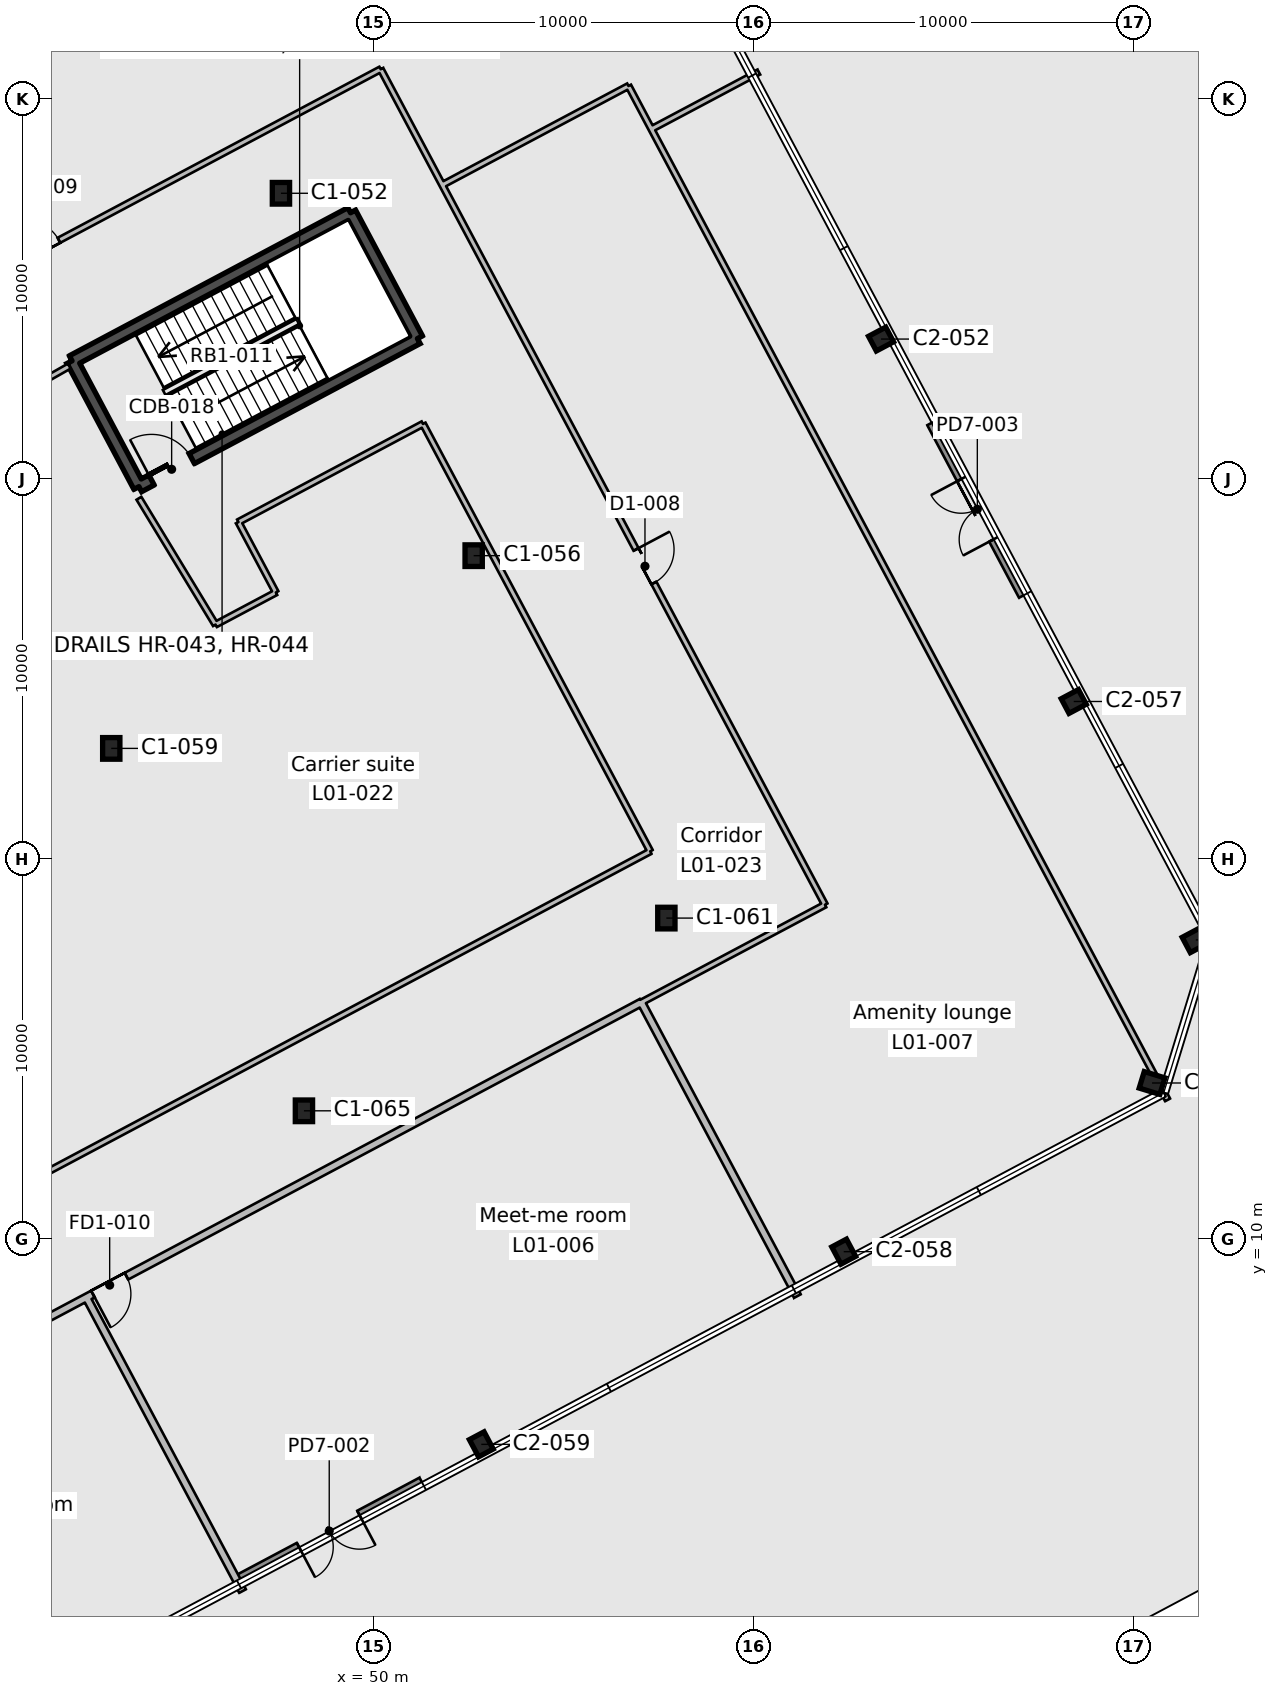
"""IFC4 building model, lengths in metres.
Left out: names, types, materials, properties, quantities, classifications, styles, units other than length and angle.
Written with IfcOpenShell. Run it as: python <this file> out.ifc"""

import sys

from ifc_helpers import new_model, si_unit, direction, frame, frame_2d, origin, origin_2d, place, context, subcontext, project, spatial, rectangle, i_section, extrude, element, fill, save


model = new_model("IFC4")
c1 = context("Model", 3, precision=1e-05, world=origin(), true_north=direction((0.0, 1.0)))
c2 = subcontext(c1, "Body", "Model", "MODEL_VIEW")
j1 = project(units=[si_unit("LENGTHUNIT", "METRE"), si_unit("PLANEANGLEUNIT", "RADIAN")], contexts=[c1])
p1 = place(None, origin())
s1 = spatial("IfcSite", under=j1, at=p1, CompositionType="ELEMENT")
p2 = place(p1, origin())
s2 = spatial("IfcBuilding", under=s1, at=p2, CompositionType="ELEMENT")
p3 = place(p2, frame((0.0, 0.0, 7.0)))
s3 = spatial("IfcBuildingStorey", under=s2, at=p3, CompositionType="ELEMENT", Elevation=7.0)
for number, where, z_axis, x_axis in (
    (1, (52.825, 4.598, 0.0), (0.0, 0.0, 1.0), (0.883, 0.469, 0.0)),
    (2, (62.361, 9.668, 0.0), (0.0, 0.0, 1.0), (0.883, 0.469, 0.0)),
):
    element("IfcColumn", number, at=place(p3, frame(where, z_axis=z_axis, x_axis=x_axis)), inside=s3, PredefinedType="COLUMN", context=c2, shape_type="SweptSolid", body=[
        extrude(i_section(OverallWidth=0.437, OverallDepth=0.513, WebThickness=0.061, FlangeThickness=0.097, FilletRadius=0.015, at=origin_2d()), origin(), (0.0, 0.0, 1.0), 5.2),
    ])
for number, where, z_axis, x_axis in (
    (3, (48.158, 13.374, 0.0), (0.0, 0.0, 1.0), (1.0, 0.0, 0.0)),
    (4, (70.474, 14.106, 0.0), (0.0, 0.0, 1.0), (0.292, 0.956, 0.0)),
    (5, (71.625, 17.871, 0.0), (0.0, 0.0, 1.0), (-0.469, 0.883, 0.0)),
    (6, (57.694, 18.445, 0.0), (0.0, 0.0, 1.0), (1.0, 0.0, 0.0)),
    (7, (43.088, 22.91, 0.0), (0.0, 0.0, 1.0), (1.0, 0.0, 0.0)),
):
    element("IfcColumn", number, at=place(p3, frame(where, z_axis=z_axis, x_axis=x_axis)), inside=s3, PredefinedType="COLUMN", context=c2, shape_type="SweptSolid", body=[
        extrude(i_section(OverallWidth=0.455, OverallDepth=0.569, WebThickness=0.078, FlangeThickness=0.125, FilletRadius=0.015, at=origin_2d()), origin(), (0.0, 0.0, 1.0), 5.2),
    ])
p4 = place(p3, frame((68.413, 24.144, 0.0), z_axis=(0.0, 0.0, 1.0), x_axis=(-0.469471562786, 0.882947592859, 0.0)))
e8 = element("IfcColumn", 8, at=p4, inside=s3, PredefinedType="COLUMN", context=c2, shape_type="SweptSolid", body=[
    extrude(i_section(OverallWidth=0.437, OverallDepth=0.513, WebThickness=0.061, FlangeThickness=0.097, FilletRadius=0.015, at=origin_2d()), origin(), (0.0, 0.0, 1.0), 5.2),
])
p5 = place(p3, frame((52.624, 27.981, 0.0), z_axis=(0.0, 0.0, 1.0), x_axis=(1.0, 0.0, 0.0)))
e9 = element("IfcColumn", 9, at=p5, inside=s3, PredefinedType="COLUMN", context=c2, shape_type="SweptSolid", body=[
    extrude(i_section(OverallWidth=0.455, OverallDepth=0.569, WebThickness=0.078, FlangeThickness=0.125, FilletRadius=0.015, at=origin_2d()), origin(), (0.0, 0.0, 1.0), 5.2),
])
p6 = place(p3, frame((63.343, 33.68, 0.0), z_axis=(0.0, 0.0, 1.0), x_axis=(-0.469471562786, 0.882947592859, 0.0)))
e10 = element("IfcColumn", 10, at=p6, inside=s3, PredefinedType="COLUMN", context=c2, shape_type="SweptSolid", body=[
    extrude(i_section(OverallWidth=0.437, OverallDepth=0.513, WebThickness=0.061, FlangeThickness=0.097, FilletRadius=0.015, at=origin_2d()), origin(), (0.0, 0.0, 1.0), 5.2),
])
p7 = place(p3, frame((47.553, 37.516, 0.0), z_axis=(0.0, 0.0, 1.0), x_axis=(1.0, 0.0, 0.0)))
e11 = element("IfcColumn", 11, at=p7, inside=s3, PredefinedType="COLUMN", context=c2, shape_type="SweptSolid", body=[
    extrude(i_section(OverallWidth=0.455, OverallDepth=0.569, WebThickness=0.078, FlangeThickness=0.125, FilletRadius=0.015, at=origin_2d()), origin(), (0.0, 0.0, 1.0), 5.2),
])
p8 = place(p3, frame((49.384, 37.004, 0.0), z_axis=(0.0, 0.0, 1.0), x_axis=(0.46946936446, -0.882948761726, 0.0)))
e12 = element("IfcWall", 12, at=p8, inside=s3, PredefinedType="SHEAR", context=c2, shape_type="SweptSolid", body=[
    extrude(rectangle(XDim=3.75, YDim=0.3, at=frame_2d((1.875, 0.0))), origin(), (0.0, 0.0, 1.0), 5.2),
])
p9 = place(p3, frame((51.145, 33.693, 0.0), z_axis=(0.0, 0.0, 1.0), x_axis=(-0.882945809314, -0.469474917132, 0.0)))
e13 = element("IfcWall", 13, at=p9, inside=s3, PredefinedType="SHEAR", context=c2, shape_type="SweptSolid", body=[
    extrude(rectangle(XDim=8.3, YDim=0.3, at=frame_2d((4.15, 0.0))), origin(), (0.0, 0.0, 1.0), 5.2),
])
p10 = place(p9, frame((6.725, 0.0, 0.0)))
e14 = element("IfcOpeningElement", 14, at=p10, cuts=e13, PredefinedType="OPENING", context=c2, shape_type="SweptSolid", body=[
    extrude(rectangle(XDim=1.2, YDim=2.1, at=frame_2d((0.6, 1.05))), frame((0.0, 0.16, 0.0), z_axis=(0.0, -1.0, 0.0), x_axis=(1.0, 0.0, 0.0)), (0.0, 0.0, 1.0), 0.32),
])
p11 = place(p3, frame((43.816, 29.796, 0.0), z_axis=(0.0, 0.0, 1.0), x_axis=(-0.46946936446, 0.882948761726, 0.0)))
e15 = element("IfcWall", 15, at=p11, inside=s3, PredefinedType="SHEAR", context=c2, shape_type="SweptSolid", body=[
    extrude(rectangle(XDim=3.75, YDim=0.3, at=frame_2d((1.875, 0.0))), origin(), (0.0, 0.0, 1.0), 5.2),
])
p12 = place(p3, frame((42.055, 33.107, 0.0), z_axis=(0.0, 0.0, 1.0), x_axis=(0.882945809314, 0.469474917132, 0.0)))
e16 = element("IfcWall", 16, at=p12, inside=s3, PredefinedType="SHEAR", context=c2, shape_type="SweptSolid", body=[
    extrude(rectangle(XDim=8.3, YDim=0.3, at=frame_2d((4.15, 0.0))), origin(), (0.0, 0.0, 1.0), 5.2),
])
p13 = place(p3, frame((46.39, 1.024, 0.0), z_axis=(0.0, 0.0, 1.0), x_axis=(0.88294935199, 0.469468254326, 0.0)))
e17 = element("IfcWall", 17, at=p13, inside=s3, PredefinedType="STANDARD", context=c2, shape_type="SweptSolid", body=[
    extrude(rectangle(XDim=5.512, YDim=0.25, at=frame_2d((2.756, 0.0))), origin(), (0.0, 0.0, 1.0), 3.612),
])
p14 = place(p13, frame((1.856, 0.0, 0.0)))
e18 = element("IfcOpeningElement", 18, at=p14, cuts=e17, PredefinedType="OPENING", context=c2, shape_type="SweptSolid", body=[
    extrude(rectangle(XDim=1.8, YDim=2.4, at=frame_2d((0.9, 1.2))), frame((0.0, 0.135, 0.0), z_axis=(0.0, -1.0, 0.0), x_axis=(1.0, 0.0, 0.0)), (0.0, 0.0, 1.0), 0.27),
])
p15 = place(p3, frame((67.083, 26.932, 0.0), z_axis=(0.0, 0.0, 1.0), x_axis=(-0.469442125026, 0.882963244564, 0.0)))
e19 = element("IfcWall", 19, at=p15, inside=s3, PredefinedType="STANDARD", context=c2, shape_type="SweptSolid", body=[
    extrude(rectangle(XDim=5.143, YDim=0.25, at=frame_2d((2.571, 0.0))), origin(), (0.0, 0.0, 1.0), 3.612),
])
p16 = place(p15, frame((1.671, 0.0, 0.0)))
e20 = element("IfcOpeningElement", 20, at=p16, cuts=e19, PredefinedType="OPENING", context=c2, shape_type="SweptSolid", body=[
    extrude(rectangle(XDim=1.8, YDim=2.4, at=frame_2d((0.9, 1.2))), frame((0.0, 0.135, 0.0), z_axis=(0.0, -1.0, 0.0), x_axis=(1.0, 0.0, 0.0)), (0.0, 0.0, 1.0), 0.27),
])
p17 = place(p3, frame((57.041, 16.229, 0.0), z_axis=(0.0, 0.0, 1.0), x_axis=(-0.882947975476, -0.469470843188, 0.0)))
e21 = element("IfcWall", 21, at=p17, inside=s3, PredefinedType="PARTITIONING", context=c2, shape_type="SweptSolid", body=[
    extrude(rectangle(XDim=49.2, YDim=0.2, at=frame_2d((24.6, 0.0))), origin(), (0.0, 0.0, 1.0), 4.75),
])
p18 = place(p17, frame((27.75, 0.0, 0.0)))
e22 = element("IfcOpeningElement", 22, at=p18, cuts=e21, PredefinedType="OPENING", context=c2, shape_type="SweptSolid", body=[
    extrude(rectangle(XDim=1.0, YDim=2.1, at=frame_2d((0.5, 1.05))), frame((0.0, 0.11, 0.0), z_axis=(0.0, -1.0, 0.0), x_axis=(1.0, 0.0, 0.0)), (0.0, 0.0, 1.0), 0.22),
])
p19 = place(p17, frame((24.05, 0.0, 0.0)))
e23 = element("IfcOpeningElement", 23, at=p19, cuts=e21, PredefinedType="OPENING", context=c2, shape_type="SweptSolid", body=[
    extrude(rectangle(XDim=1.0, YDim=2.1, at=frame_2d((0.5, 1.05))), frame((0.0, 0.11, 0.0), z_axis=(0.0, -1.0, 0.0), x_axis=(1.0, 0.0, 0.0)), (0.0, 0.0, 1.0), 0.22),
])
p20 = place(p17, frame((15.35, 0.0, 0.0)))
e24 = element("IfcOpeningElement", 24, at=p20, cuts=e21, PredefinedType="OPENING", context=c2, shape_type="SweptSolid", body=[
    extrude(rectangle(XDim=1.0, YDim=2.1, at=frame_2d((0.5, 1.05))), frame((0.0, 0.11, 0.0), z_axis=(0.0, -1.0, 0.0), x_axis=(1.0, 0.0, 0.0)), (0.0, 0.0, 1.0), 0.22),
])
p21 = place(p3, frame((28.633, 35.611, 0.0), z_axis=(0.0, 0.0, 1.0), x_axis=(0.882947109015, 0.469472472762, 0.0)))
e25 = element("IfcWall", 25, at=p21, inside=s3, PredefinedType="PARTITIONING", context=c2, shape_type="SweptSolid", body=[
    extrude(rectangle(XDim=16.484, YDim=0.2, at=frame_2d((8.242, 0.0))), origin(), (0.0, 0.0, 1.0), 4.75),
])
p22 = place(p3, frame((32.308, 31.279, 0.0), z_axis=(0.0, 0.0, 1.0), x_axis=(0.882939951573, 0.469485933673, 0.0)))
e26 = element("IfcWall", 26, at=p22, inside=s3, PredefinedType="PARTITIONING", context=c2, shape_type="SweptSolid", body=[
    extrude(rectangle(XDim=20.239, YDim=0.15, at=frame_2d((10.12, 0.0))), origin(), (0.0, 0.0, 1.0), 4.75),
])
p23 = place(p22, frame((9.65, 0.0, 0.0)))
e27 = element("IfcOpeningElement", 27, at=p23, cuts=e26, PredefinedType="OPENING", context=c2, shape_type="SweptSolid", body=[
    extrude(rectangle(XDim=1.0, YDim=2.1, at=frame_2d((0.5, 1.05))), frame((0.0, 0.085, 0.0), z_axis=(0.0, -1.0, 0.0), x_axis=(1.0, 0.0, 0.0)), (0.0, 0.0, 1.0), 0.17),
])
p24 = place(p3, frame((50.178, 40.781, 0.0), z_axis=(0.0, 0.0, 1.0), x_axis=(0.469355564401, -0.883009260521, 0.0)))
e28 = element("IfcWall", 28, at=p24, inside=s3, PredefinedType="PARTITIONING", context=c2, shape_type="SweptSolid", body=[
    extrude(rectangle(XDim=3.445, YDim=0.15, at=frame_2d((1.723, 0.0))), origin(), (0.0, 0.0, 1.0), 4.75),
])
p25 = place(p3, frame((42.435, 8.462, 0.0), z_axis=(0.0, 0.0, 1.0), x_axis=(0.469519026901, -0.882922354105, 0.0)))
e29 = element("IfcWall", 29, at=p25, inside=s3, PredefinedType="PARTITIONING", context=c2, shape_type="SweptSolid", body=[
    extrude(rectangle(XDim=8.749, YDim=0.2, at=frame_2d((4.375, 0.0))), origin(), (0.0, 0.0, 1.0), 4.75),
])
p26 = place(p3, frame((48.541, 15.56, 0.0), z_axis=(0.0, 0.0, 1.0), x_axis=(-0.882933406877, -0.469498241765, 0.0)))
e30 = element("IfcWall", 30, at=p26, inside=s3, PredefinedType="PARTITIONING", context=c2, shape_type="SweptSolid", body=[
    extrude(rectangle(XDim=10.164, YDim=0.15, at=frame_2d((5.082, 0.0))), origin(), (0.0, 0.0, 1.0), 4.75),
])
p27 = place(p3, frame((31.069, 26.77, 0.0), z_axis=(0.0, 0.0, 1.0), x_axis=(0.86954617394, 0.493851649168, 0.0)))
e31 = element("IfcWall", 31, at=p27, inside=s3, PredefinedType="PARTITIONING", context=c2, shape_type="SweptSolid", body=[
    extrude(rectangle(XDim=12.55, YDim=0.15, at=frame_2d((6.275, 0.0))), origin(), (0.0, 0.0, 1.0), 4.75),
])
p28 = place(p3, frame((43.816, 29.491, 0.0), z_axis=(0.0, 0.0, 1.0), x_axis=(0.518473208291, -0.855093873376, 0.0)))
e32 = element("IfcWall", 32, at=p28, inside=s3, PredefinedType="PARTITIONING", context=c2, shape_type="SweptSolid", body=[
    extrude(rectangle(XDim=1.325, YDim=0.15, at=frame_2d((0.663, 0.0))), origin(), (0.0, 0.0, 1.0), 4.75),
])
p29 = place(p3, frame((45.831, 26.167, 0.0), z_axis=(0.0, 0.0, 1.0), x_axis=(-0.518386189645, 0.855146629757, 0.0)))
e33 = element("IfcWall", 33, at=p29, inside=s3, PredefinedType="PARTITIONING", context=c2, shape_type="SweptSolid", body=[
    extrude(rectangle(XDim=2.562, YDim=0.15, at=frame_2d((1.281, 0.0))), origin(), (0.0, 0.0, 1.0), 4.75),
])
p30 = place(p3, frame((47.42, 27.012, 0.0), z_axis=(0.0, 0.0, 1.0), x_axis=(-0.882911879422, -0.469538723829, 0.0)))
e34 = element("IfcWall", 34, at=p30, inside=s3, PredefinedType="PARTITIONING", context=c2, shape_type="SweptSolid", body=[
    extrude(rectangle(XDim=1.8, YDim=0.15, at=frame_2d((0.9, 0.0))), origin(), (0.0, 0.0, 1.0), 4.75),
])
p31 = place(p3, frame((57.034, 16.225, 0.0), z_axis=(0.0, 0.0, 1.0), x_axis=(0.469482945701, -0.882941540361, 0.0)))
e35 = element("IfcWall", 35, at=p31, inside=s3, PredefinedType="PARTITIONING", context=c2, shape_type="SweptSolid", body=[
    extrude(rectangle(XDim=8.75, YDim=0.2, at=frame_2d((4.375, 0.0))), origin(), (0.0, 0.0, 1.0), 4.75),
])
p32 = place(p3, frame((46.434, 28.866, 0.0), z_axis=(0.0, 0.0, 1.0), x_axis=(0.882942083458, 0.469481924316, 0.0)))
e36 = element("IfcWall", 36, at=p32, inside=s3, PredefinedType="PARTITIONING", context=c2, shape_type="SweptSolid", body=[
    extrude(rectangle(XDim=5.5, YDim=0.15, at=frame_2d((2.75, 0.0))), origin(), (0.0, 0.0, 1.0), 4.75),
])
p33 = place(p3, frame((51.29, 31.448, 0.0), z_axis=(0.0, 0.0, 1.0), x_axis=(0.469459757109, -0.882953869947, 0.0)))
e37 = element("IfcWall", 37, at=p33, inside=s3, PredefinedType="PARTITIONING", context=c2, shape_type="SweptSolid", body=[
    extrude(rectangle(XDim=12.738, YDim=0.15, at=frame_2d((6.369, 0.0))), origin(), (0.0, 0.0, 1.0), 4.75),
])
p34 = place(p3, frame((57.27, 20.201, 0.0), z_axis=(0.0, 0.0, 1.0), x_axis=(-0.882965394181, -0.469438081837, 0.0)))
e38 = element("IfcWall", 38, at=p34, inside=s3, PredefinedType="PARTITIONING", context=c2, shape_type="SweptSolid", body=[
    extrude(rectangle(XDim=9.886, YDim=0.15, at=frame_2d((4.943, 0.0))), origin(), (0.0, 0.0, 1.0), 4.75),
])
p35 = place(p3, frame((47.42, 27.012, 0.0), z_axis=(0.0, 0.0, 1.0), x_axis=(-0.469489562011, 0.882938022266, 0.0)))
e39 = element("IfcWall", 39, at=p35, inside=s3, PredefinedType="PARTITIONING", context=c2, shape_type="SweptSolid", body=[
    extrude(rectangle(XDim=2.1, YDim=0.15, at=frame_2d((1.05, 0.0))), origin(), (0.0, 0.0, 1.0), 4.75),
])
p36 = place(p3, frame((51.795, 37.739, 0.0), z_axis=(0.0, 0.0, 1.0), x_axis=(0.469473160434, -0.882946743373, 0.0)))
e40 = element("IfcWall", 40, at=p36, inside=s3, PredefinedType="PARTITIONING", context=c2, shape_type="SweptSolid", body=[
    extrude(rectangle(XDim=1.216, YDim=0.15, at=frame_2d((0.608, 0.0))), origin(), (0.0, 0.0, 1.0), 4.75),
])
p37 = place(p3, frame((52.351, 38.029, 0.0), z_axis=(0.0, 0.0, 1.0), x_axis=(0.882969925021, 0.469429559688, 0.0)))
e41 = element("IfcWall", 41, at=p37, inside=s3, PredefinedType="PARTITIONING", context=c2, shape_type="SweptSolid", body=[
    extrude(rectangle(XDim=4.923, YDim=0.15, at=frame_2d((2.461, 0.0))), origin(), (0.0, 0.0, 1.0), 4.75),
])
p38 = place(p3, frame((56.698, 40.34, 0.0), z_axis=(0.0, 0.0, 1.0), x_axis=(0.468946315527, -0.883226671446, 0.0)))
e42 = element("IfcWall", 42, at=p38, inside=s3, PredefinedType="PARTITIONING", context=c2, shape_type="SweptSolid", body=[
    extrude(rectangle(XDim=1.282, YDim=0.15, at=frame_2d((0.641, 0.0))), origin(), (0.0, 0.0, 1.0), 4.75),
])
p39 = place(p3, frame((51.798, 37.734, 0.0), z_axis=(0.0, 0.0, 1.0), x_axis=(0.882191163795, 0.470891442396, 0.0)))
e43 = element("IfcWall", 43, at=p39, inside=s3, PredefinedType="PARTITIONING", context=c2, shape_type="SweptSolid", body=[
    extrude(rectangle(XDim=0.627, YDim=0.15, at=frame_2d((0.313, 0.0))), origin(), (0.0, 0.0, 1.0), 4.75),
])
p40 = place(p3, frame((57.041, 16.229, 0.0), z_axis=(0.0, 0.0, 1.0), x_axis=(0.882918476145, 0.469526319265, 0.0)))
e44 = element("IfcWall", 44, at=p40, inside=s3, PredefinedType="PARTITIONING", context=c2, shape_type="SweptSolid", body=[
    extrude(rectangle(XDim=5.467, YDim=0.15, at=frame_2d((2.733, 0.0))), origin(), (0.0, 0.0, 1.0), 4.75),
])
p41 = place(p3, frame((52.366, 36.665, 0.0), z_axis=(0.0, 0.0, 1.0), x_axis=(0.469480933333, -0.882942610387, 0.0)))
e45 = element("IfcWall", 45, at=p41, inside=s3, PredefinedType="PARTITIONING", context=c2, shape_type="SweptSolid", body=[
    extrude(rectangle(XDim=20.239, YDim=0.15, at=frame_2d((10.12, 0.0))), origin(), (0.0, 0.0, 1.0), 4.75),
])
p42 = place(p41, frame((9.65, 0.0, 0.0)))
e46 = element("IfcOpeningElement", 46, at=p42, cuts=e45, PredefinedType="OPENING", context=c2, shape_type="SweptSolid", body=[
    extrude(rectangle(XDim=1.0, YDim=2.1, at=frame_2d((0.5, 1.05))), frame((0.0, 0.085, 0.0), z_axis=(0.0, -1.0, 0.0), x_axis=(1.0, 0.0, 0.0)), (0.0, 0.0, 1.0), 0.17),
])
p43 = place(p3, frame((57.299, 39.208, 0.0), z_axis=(0.0, 0.0, 1.0), x_axis=(0.469480728433, -0.882942719337, 0.0)))
e47 = element("IfcWall", 47, at=p43, inside=s3, PredefinedType="PARTITIONING", context=c2, shape_type="SweptSolid", body=[
    extrude(rectangle(XDim=28.934, YDim=0.15, at=frame_2d((14.467, 0.0))), origin(), (0.0, 0.0, 1.0), 4.75),
])
p44 = place(p3, frame((60.127, 40.707, 0.0), z_axis=(0.0, 0.0, 1.0), x_axis=(-0.883027796121, -0.469320691295, 0.0)))
e48 = element("IfcWall", 48, at=p44, inside=s3, PredefinedType="PARTITIONING", context=c2, shape_type="SweptSolid", body=[
    extrude(rectangle(XDim=3.2, YDim=0.15, at=frame_2d((1.6, 0.0))), origin(), (0.0, 0.0, 1.0), 4.75),
])
p45 = place(p10, frame((1.2, 0.0, 0.0), z_axis=(0.0, 0.0, 1.0), x_axis=(-1.0, 0.0, 0.0)))
e49 = element("IfcDoor", 49, at=p45, inside=s3, OperationType="SINGLE_SWING_LEFT", PredefinedType="DOOR", context=c2, shape_type="SweptSolid", body=[
    extrude(rectangle(XDim=1.2, YDim=2.1, at=frame_2d((0.6, 1.05))), frame((0.0, 0.025, 0.0), z_axis=(0.0, -1.0, 0.0), x_axis=(1.0, 0.0, 0.0)), (0.0, 0.0, 1.0), 0.05),
])
fill(e14, e49)
p46 = place(p14, frame((1.8, 0.0, 0.0), z_axis=(0.0, 0.0, 1.0), x_axis=(-1.0, 0.0, 0.0)))
e50 = element("IfcDoor", 50, at=p46, inside=s3, OperationType="DOUBLE_DOOR_SINGLE_SWING", PredefinedType="DOOR", context=c2, shape_type="SweptSolid", body=[
    extrude(rectangle(XDim=1.8, YDim=2.4, at=frame_2d((0.9, 1.2))), frame((0.0, 0.025, 0.0), z_axis=(0.0, -1.0, 0.0), x_axis=(1.0, 0.0, 0.0)), (0.0, 0.0, 1.0), 0.05),
])
fill(e18, e50)
p47 = place(p16, origin())
e51 = element("IfcDoor", 51, at=p47, inside=s3, OperationType="DOUBLE_DOOR_SINGLE_SWING", PredefinedType="DOOR", context=c2, shape_type="SweptSolid", body=[
    extrude(rectangle(XDim=1.8, YDim=2.4, at=frame_2d((0.9, 1.2))), frame((0.0, 0.025, 0.0), z_axis=(0.0, -1.0, 0.0), x_axis=(1.0, 0.0, 0.0)), (0.0, 0.0, 1.0), 0.05),
])
fill(e20, e51)
p48 = place(p20, origin())
e52 = element("IfcDoor", 52, at=p48, inside=s3, OperationType="SINGLE_SWING_RIGHT", PredefinedType="DOOR", context=c2, shape_type="SweptSolid", body=[
    extrude(rectangle(XDim=1.0, YDim=2.1, at=frame_2d((0.5, 1.05))), frame((0.0, 0.025, 0.0), z_axis=(0.0, -1.0, 0.0), x_axis=(1.0, 0.0, 0.0)), (0.0, 0.0, 1.0), 0.05),
])
fill(e24, e52)
p49 = place(p42, origin())
e53 = element("IfcDoor", 53, at=p49, inside=s3, OperationType="SINGLE_SWING_LEFT", PredefinedType="DOOR", context=c2, shape_type="SweptSolid", body=[
    extrude(rectangle(XDim=1.0, YDim=2.1, at=frame_2d((0.5, 1.05))), frame((0.0, 0.025, 0.0), z_axis=(0.0, -1.0, 0.0), x_axis=(1.0, 0.0, 0.0)), (0.0, 0.0, 1.0), 0.05),
])
fill(e46, e53)
p50 = place(p23, origin())
e54 = element("IfcDoor", 54, at=p50, inside=s3, OperationType="SINGLE_SWING_LEFT", PredefinedType="DOOR", context=c2, shape_type="SweptSolid", body=[
    extrude(rectangle(XDim=1.0, YDim=2.1, at=frame_2d((0.5, 1.05))), frame((0.0, 0.025, 0.0), z_axis=(0.0, -1.0, 0.0), x_axis=(1.0, 0.0, 0.0)), (0.0, 0.0, 1.0), 0.05),
])
fill(e27, e54)
save(model, sys.argv[1])
